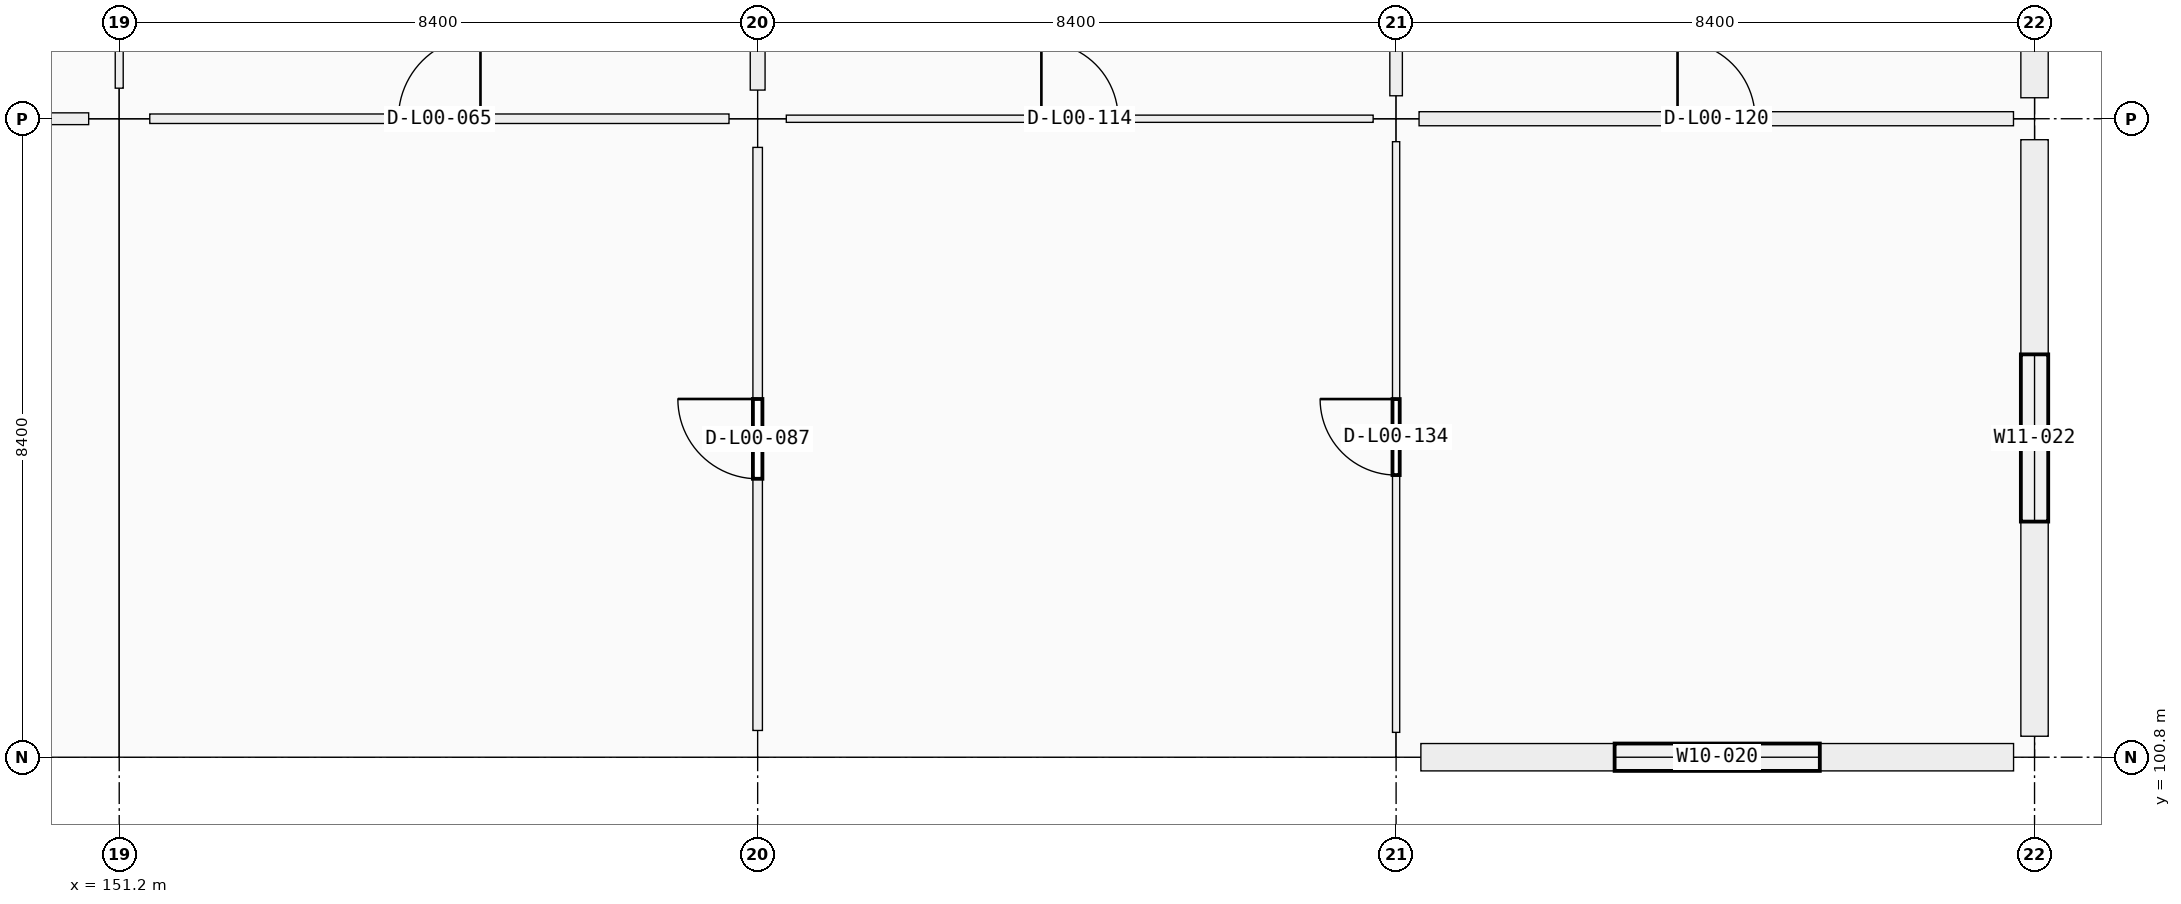
"""IFC4 building model, lengths in metres.
Left out: names, types, materials, properties, quantities, classifications, styles, units other than length and angle.
Written with IfcOpenShell. Run it as: python <this file> out.ifc"""

import sys

from ifc_helpers import new_model, si_unit, direction, frame, frame_2d, origin, origin_2d, place, context, subcontext, project, spatial, rectangle, extrude, element, fill, save


model = new_model("IFC4")
c1 = context("Model", 3, precision=1e-05, world=origin(), true_north=direction((0.0, 1.0)))
c2 = subcontext(c1, "Body", "Model", "MODEL_VIEW")
j1 = project(units=[si_unit("LENGTHUNIT", "METRE"), si_unit("PLANEANGLEUNIT", "RADIAN")], contexts=[c1])
p1 = place(None, origin())
s1 = spatial("IfcSite", under=j1, at=p1, CompositionType="ELEMENT")
p2 = place(p1, origin())
s2 = spatial("IfcBuilding", under=s1, at=p2, CompositionType="ELEMENT")
p3 = place(p2, origin())
s3 = spatial("IfcBuildingStorey", under=s2, at=p3, CompositionType="ELEMENT", Elevation=0.0)
for number, where, z_axis, x_axis in (
    (1, (151.2, 100.8, 0.0), (0.0, 0.0, 1.0), (1.0, 0.0, 0.0)),
    (2, (151.2, 109.2, 0.0), (0.0, 0.0, 1.0), (1.0, 0.0, 0.0)),
):
    element("IfcColumn", number, at=place(p3, frame(where, z_axis=z_axis, x_axis=x_axis)), inside=s3, PredefinedType="COLUMN", context=c2, shape_type="SweptSolid", body=[
        extrude(rectangle(XDim=0.8, YDim=0.8, at=origin_2d()), origin(), (0.0, 0.0, 1.0), 5.76),
    ])
p4 = place(p3, frame((159.6, 100.8, 0.0), z_axis=(0.0, 0.0, 1.0), x_axis=(1.0, 0.0, 0.0)))
e3 = element("IfcColumn", 3, at=p4, inside=s3, PredefinedType="COLUMN", context=c2, shape_type="SweptSolid", body=[
    extrude(rectangle(XDim=0.7, YDim=0.7, at=origin_2d()), origin(), (0.0, 0.0, 1.0), 5.76),
])
p5 = place(p3, frame((159.6, 109.2, 0.0), z_axis=(0.0, 0.0, 1.0), x_axis=(1.0, 0.0, 0.0)))
e4 = element("IfcColumn", 4, at=p5, inside=s3, PredefinedType="COLUMN", context=c2, shape_type="SweptSolid", body=[
    extrude(rectangle(XDim=0.75, YDim=0.75, at=origin_2d()), origin(), (0.0, 0.0, 1.0), 5.76),
])
p6 = place(p3, frame((168.0, 100.8, 0.0), z_axis=(0.0, 0.0, 1.0), x_axis=(1.0, 0.0, 0.0)))
e5 = element("IfcColumn", 5, at=p6, inside=s3, PredefinedType="COLUMN", context=c2, shape_type="SweptSolid", body=[
    extrude(rectangle(XDim=0.65, YDim=0.65, at=origin_2d()), origin(), (0.0, 0.0, 1.0), 5.76),
])
p7 = place(p3, frame((168.0, 109.2, 0.0), z_axis=(0.0, 0.0, 1.0), x_axis=(1.0, 0.0, 0.0)))
e6 = element("IfcColumn", 6, at=p7, inside=s3, PredefinedType="COLUMN", context=c2, shape_type="SweptSolid", body=[
    extrude(rectangle(XDim=0.6, YDim=0.6, at=origin_2d()), origin(), (0.0, 0.0, 1.0), 5.76),
])
for number, where, z_axis, x_axis in (
    (7, (176.4, 100.8, 0.0), (0.0, 0.0, 1.0), (1.0, 0.0, 0.0)),
    (8, (176.4, 109.2, 0.0), (0.0, 0.0, 1.0), (1.0, 0.0, 0.0)),
):
    element("IfcColumn", number, at=place(p3, frame(where, z_axis=z_axis, x_axis=x_axis)), inside=s3, PredefinedType="COLUMN", context=c2, shape_type="SweptSolid", body=[
        extrude(rectangle(XDim=0.55, YDim=0.55, at=origin_2d()), origin(), (0.0, 0.0, 1.0), 5.51),
    ])
p8 = place(p3, frame((176.124, 100.8, 0.0), z_axis=(0.0, 0.0, 1.0), x_axis=(-1.0, 0.0, 0.0)))
e9 = element("IfcWall", 9, at=p8, inside=s3, PredefinedType="SOLIDWALL", context=c2, shape_type="SweptSolid", body=[
    extrude(rectangle(XDim=7.798, YDim=0.36, at=frame_2d((3.899, 0.0))), origin(), (0.0, 0.0, 1.0), 4.7),
])
p9 = place(p8, frame((2.549, 0.0, 0.9)))
e10 = element("IfcOpeningElement", 10, at=p9, cuts=e9, PredefinedType="OPENING", context=c2, shape_type="SweptSolid", body=[
    extrude(rectangle(XDim=2.7, YDim=1.2, at=frame_2d((1.35, 0.6))), frame((0.0, 0.18, 0.0), z_axis=(0.0, -1.0, 0.0), x_axis=(1.0, 0.0, 0.0)), (0.0, 0.0, 1.0), 0.36),
])
p10 = place(p3, frame((176.4, 108.924, 0.0), z_axis=(0.0, 0.0, 1.0), x_axis=(0.0, -1.0, 0.0)))
e11 = element("IfcWall", 11, at=p10, inside=s3, PredefinedType="SOLIDWALL", context=c2, shape_type="SweptSolid", body=[
    extrude(rectangle(XDim=7.848, YDim=0.36, at=frame_2d((3.924, 0.0))), origin(), (0.0, 0.0, 1.0), 4.7),
])
p11 = place(p10, frame((2.824, 0.0, 0.9)))
e12 = element("IfcOpeningElement", 12, at=p11, cuts=e11, PredefinedType="OPENING", context=c2, shape_type="SweptSolid", body=[
    extrude(rectangle(XDim=2.2, YDim=1.35, at=frame_2d((1.1, 0.675))), frame((0.0, 0.18, 0.0), z_axis=(0.0, -1.0, 0.0), x_axis=(1.0, 0.0, 0.0)), (0.0, 0.0, 1.0), 0.36),
])
p12 = place(p3, frame((176.4, 117.324, 0.0), z_axis=(0.0, 0.0, 1.0), x_axis=(0.0, -1.0, 0.0)))
e13 = element("IfcWall", 13, at=p12, inside=s3, PredefinedType="SOLIDWALL", context=c2, shape_type="SweptSolid", body=[
    extrude(rectangle(XDim=7.848, YDim=0.36, at=frame_2d((3.924, 0.0))), origin(), (0.0, 0.0, 1.0), 4.7),
])
p13 = place(p12, frame((2.824, 0.0, 0.9)))
e14 = element("IfcOpeningElement", 14, at=p13, cuts=e13, PredefinedType="OPENING", context=c2, shape_type="SweptSolid", body=[
    extrude(rectangle(XDim=2.2, YDim=1.75, at=frame_2d((1.1, 0.875))), frame((0.0, 0.18, 0.0), z_axis=(0.0, -1.0, 0.0), x_axis=(1.0, 0.0, 0.0)), (0.0, 0.0, 1.0), 0.36),
])
p14 = place(p3, frame((143.202, 109.2, 0.0), z_axis=(0.0, 0.0, 1.0), x_axis=(1.0, 0.0, 0.0)))
e15 = element("IfcWall", 15, at=p14, inside=s3, PredefinedType="PARTITIONING", context=c2, shape_type="SweptSolid", body=[
    extrude(rectangle(XDim=7.596, YDim=0.155, at=frame_2d((3.798, 0.0))), origin(), (0.0, 0.0, 1.0), 3.66),
])
p15 = place(p14, frame((3.333, 0.0, 0.0)))
e16 = element("IfcOpeningElement", 16, at=p15, cuts=e15, PredefinedType="OPENING", context=c2, shape_type="SweptSolid", body=[
    extrude(rectangle(XDim=0.93, YDim=2.12, at=frame_2d((0.465, 1.06))), frame((0.0, 0.078, 0.0), z_axis=(0.0, -1.0, 0.0), x_axis=(1.0, 0.0, 0.0)), (0.0, 0.0, 1.0), 0.155),
])
p16 = place(p3, frame((151.602, 109.2, 0.0), z_axis=(0.0, 0.0, 1.0), x_axis=(1.0, 0.0, 0.0)))
e17 = element("IfcWall", 17, at=p16, inside=s3, PredefinedType="PARTITIONING", context=c2, shape_type="SweptSolid", body=[
    extrude(rectangle(XDim=7.621, YDim=0.125, at=frame_2d((3.811, 0.0))), origin(), (0.0, 0.0, 1.0), 3.66),
])
p17 = place(p16, frame((3.271, 0.0, 0.0)))
e18 = element("IfcOpeningElement", 18, at=p17, cuts=e17, PredefinedType="OPENING", context=c2, shape_type="SweptSolid", body=[
    extrude(rectangle(XDim=1.08, YDim=2.25, at=frame_2d((0.54, 1.125))), frame((0.0, 0.062, 0.0), z_axis=(0.0, -1.0, 0.0), x_axis=(1.0, 0.0, 0.0)), (0.0, 0.0, 1.0), 0.125),
])
p18 = place(p3, frame((159.977, 109.2, 0.0), z_axis=(0.0, 0.0, 1.0), x_axis=(1.0, 0.0, 0.0)))
e19 = element("IfcWall", 19, at=p18, inside=s3, PredefinedType="PARTITIONING", context=c2, shape_type="SweptSolid", body=[
    extrude(rectangle(XDim=7.721, YDim=0.095, at=frame_2d((3.86, 0.0))), origin(), (0.0, 0.0, 1.0), 3.66),
])
p19 = place(p18, frame((3.356, 0.0, 0.0)))
e20 = element("IfcOpeningElement", 20, at=p19, cuts=e19, PredefinedType="OPENING", context=c2, shape_type="SweptSolid", body=[
    extrude(rectangle(XDim=1.01, YDim=2.12, at=frame_2d((0.505, 1.06))), frame((0.0, 0.047, 0.0), z_axis=(0.0, -1.0, 0.0), x_axis=(1.0, 0.0, 0.0)), (0.0, 0.0, 1.0), 0.095),
])
p20 = place(p3, frame((168.302, 109.2, 0.0), z_axis=(0.0, 0.0, 1.0), x_axis=(1.0, 0.0, 0.0)))
e21 = element("IfcWall", 21, at=p20, inside=s3, PredefinedType="PARTITIONING", context=c2, shape_type="SweptSolid", body=[
    extrude(rectangle(XDim=7.821, YDim=0.185, at=frame_2d((3.911, 0.0))), origin(), (0.0, 0.0, 1.0), 3.66),
])
p21 = place(p20, frame((3.401, 0.0, 0.0)))
e22 = element("IfcOpeningElement", 22, at=p21, cuts=e21, PredefinedType="OPENING", context=c2, shape_type="SweptSolid", body=[
    extrude(rectangle(XDim=1.02, YDim=2.2, at=frame_2d((0.51, 1.1))), frame((0.0, 0.093, 0.0), z_axis=(0.0, -1.0, 0.0), x_axis=(1.0, 0.0, 0.0)), (0.0, 0.0, 1.0), 0.185),
])
p22 = place(p3, frame((151.2, 109.602, 0.0), z_axis=(0.0, 0.0, 1.0), x_axis=(0.0, 1.0, 0.0)))
e23 = element("IfcWall", 23, at=p22, inside=s3, PredefinedType="PARTITIONING", context=c2, shape_type="SweptSolid", body=[
    extrude(rectangle(XDim=7.721, YDim=0.105, at=frame_2d((3.86, 0.0))), origin(), (0.0, 0.0, 1.0), 3.66),
])
p23 = place(p22, frame((3.401, 0.0, 0.0)))
e24 = element("IfcOpeningElement", 24, at=p23, cuts=e23, PredefinedType="OPENING", context=c2, shape_type="SweptSolid", body=[
    extrude(rectangle(XDim=0.92, YDim=2.15, at=frame_2d((0.46, 1.075))), frame((0.0, 0.052, 0.0), z_axis=(0.0, -1.0, 0.0), x_axis=(1.0, 0.0, 0.0)), (0.0, 0.0, 1.0), 0.105),
])
p24 = place(p3, frame((159.6, 101.152, 0.0), z_axis=(0.0, 0.0, 1.0), x_axis=(0.0, 1.0, 0.0)))
e25 = element("IfcWall", 25, at=p24, inside=s3, PredefinedType="PARTITIONING", context=c2, shape_type="SweptSolid", body=[
    extrude(rectangle(XDim=7.671, YDim=0.125, at=frame_2d((3.835, 0.0))), origin(), (0.0, 0.0, 1.0), 3.66),
])
p25 = place(p24, frame((3.311, 0.0, 0.0)))
e26 = element("IfcOpeningElement", 26, at=p25, cuts=e25, PredefinedType="OPENING", context=c2, shape_type="SweptSolid", body=[
    extrude(rectangle(XDim=1.05, YDim=2.12, at=frame_2d((0.525, 1.06))), frame((0.0, 0.062, 0.0), z_axis=(0.0, -1.0, 0.0), x_axis=(1.0, 0.0, 0.0)), (0.0, 0.0, 1.0), 0.125),
])
p26 = place(p3, frame((159.6, 109.577, 0.0), z_axis=(0.0, 0.0, 1.0), x_axis=(0.0, 1.0, 0.0)))
e27 = element("IfcWall", 27, at=p26, inside=s3, PredefinedType="PARTITIONING", context=c2, shape_type="SweptSolid", body=[
    extrude(rectangle(XDim=7.671, YDim=0.195, at=frame_2d((3.835, 0.0))), origin(), (0.0, 0.0, 1.0), 3.66),
])
p27 = place(p26, frame((3.351, 0.0, 0.0)))
e28 = element("IfcOpeningElement", 28, at=p27, cuts=e27, PredefinedType="OPENING", context=c2, shape_type="SweptSolid", body=[
    extrude(rectangle(XDim=0.97, YDim=2.12, at=frame_2d((0.485, 1.06))), frame((0.0, 0.098, 0.0), z_axis=(0.0, -1.0, 0.0), x_axis=(1.0, 0.0, 0.0)), (0.0, 0.0, 1.0), 0.195),
])
p28 = place(p3, frame((168.0, 101.127, 0.0), z_axis=(0.0, 0.0, 1.0), x_axis=(0.0, 1.0, 0.0)))
e29 = element("IfcWall", 29, at=p28, inside=s3, PredefinedType="PARTITIONING", context=c2, shape_type="SweptSolid", body=[
    extrude(rectangle(XDim=7.771, YDim=0.095, at=frame_2d((3.885, 0.0))), origin(), (0.0, 0.0, 1.0), 3.66),
])
p29 = place(p28, frame((3.385, 0.0, 0.0)))
e30 = element("IfcOpeningElement", 30, at=p29, cuts=e29, PredefinedType="OPENING", context=c2, shape_type="SweptSolid", body=[
    extrude(rectangle(XDim=1.0, YDim=2.2, at=frame_2d((0.5, 1.1))), frame((0.0, 0.047, 0.0), z_axis=(0.0, -1.0, 0.0), x_axis=(1.0, 0.0, 0.0)), (0.0, 0.0, 1.0), 0.095),
])
p30 = place(p3, frame((168.0, 109.502, 0.0), z_axis=(0.0, 0.0, 1.0), x_axis=(0.0, 1.0, 0.0)))
e31 = element("IfcWall", 31, at=p30, inside=s3, PredefinedType="PARTITIONING", context=c2, shape_type="SweptSolid", body=[
    extrude(rectangle(XDim=7.771, YDim=0.165, at=frame_2d((3.885, 0.0))), origin(), (0.0, 0.0, 1.0), 3.66),
])
p31 = place(p30, frame((3.365, 0.0, 0.0)))
e32 = element("IfcOpeningElement", 32, at=p31, cuts=e31, PredefinedType="OPENING", context=c2, shape_type="SweptSolid", body=[
    extrude(rectangle(XDim=1.04, YDim=2.2, at=frame_2d((0.52, 1.1))), frame((0.0, 0.083, 0.0), z_axis=(0.0, -1.0, 0.0), x_axis=(1.0, 0.0, 0.0)), (0.0, 0.0, 1.0), 0.165),
])
p32 = place(p9, origin())
e33 = element("IfcWindow", 33, at=p32, inside=s3, PartitioningType="SINGLE_PANEL", PredefinedType="WINDOW", context=c2, shape_type="SweptSolid", body=[
    extrude(rectangle(XDim=2.7, YDim=1.2, at=frame_2d((1.35, 0.6))), frame((0.0, 0.03, 0.0), z_axis=(0.0, -1.0, 0.0), x_axis=(1.0, 0.0, 0.0)), (0.0, 0.0, 1.0), 0.06),
])
fill(e10, e33)
p33 = place(p11, origin())
e34 = element("IfcWindow", 34, at=p33, inside=s3, PartitioningType="SINGLE_PANEL", PredefinedType="WINDOW", context=c2, shape_type="SweptSolid", body=[
    extrude(rectangle(XDim=2.2, YDim=1.35, at=frame_2d((1.1, 0.675))), frame((0.0, 0.03, 0.0), z_axis=(0.0, -1.0, 0.0), x_axis=(1.0, 0.0, 0.0)), (0.0, 0.0, 1.0), 0.06),
])
fill(e12, e34)
p34 = place(p17, origin())
e35 = element("IfcDoor", 35, at=p34, inside=s3, OperationType="SINGLE_SWING_RIGHT", PredefinedType="DOOR", context=c2, shape_type="SweptSolid", body=[
    extrude(rectangle(XDim=1.08, YDim=2.25, at=frame_2d((0.54, 1.125))), frame((0.0, 0.025, 0.0), z_axis=(0.0, -1.0, 0.0), x_axis=(1.0, 0.0, 0.0)), (0.0, 0.0, 1.0), 0.05),
])
fill(e18, e35)
p35 = place(p25, origin())
e36 = element("IfcDoor", 36, at=p35, inside=s3, OperationType="SINGLE_SWING_RIGHT", PredefinedType="DOOR", context=c2, shape_type="SweptSolid", body=[
    extrude(rectangle(XDim=1.05, YDim=2.12, at=frame_2d((0.525, 1.06))), frame((0.0, 0.025, 0.0), z_axis=(0.0, -1.0, 0.0), x_axis=(1.0, 0.0, 0.0)), (0.0, 0.0, 1.0), 0.05),
])
fill(e26, e36)
p36 = place(p19, origin())
e37 = element("IfcDoor", 37, at=p36, inside=s3, OperationType="SINGLE_SWING_LEFT", PredefinedType="DOOR", context=c2, shape_type="SweptSolid", body=[
    extrude(rectangle(XDim=1.01, YDim=2.12, at=frame_2d((0.505, 1.06))), frame((0.0, 0.025, 0.0), z_axis=(0.0, -1.0, 0.0), x_axis=(1.0, 0.0, 0.0)), (0.0, 0.0, 1.0), 0.05),
])
fill(e20, e37)
p37 = place(p21, origin())
e38 = element("IfcDoor", 38, at=p37, inside=s3, OperationType="SINGLE_SWING_LEFT", PredefinedType="DOOR", context=c2, shape_type="SweptSolid", body=[
    extrude(rectangle(XDim=1.02, YDim=2.2, at=frame_2d((0.51, 1.1))), frame((0.0, 0.025, 0.0), z_axis=(0.0, -1.0, 0.0), x_axis=(1.0, 0.0, 0.0)), (0.0, 0.0, 1.0), 0.05),
])
fill(e22, e38)
p38 = place(p29, origin())
e39 = element("IfcDoor", 39, at=p38, inside=s3, OperationType="SINGLE_SWING_RIGHT", PredefinedType="DOOR", context=c2, shape_type="SweptSolid", body=[
    extrude(rectangle(XDim=1.0, YDim=2.2, at=frame_2d((0.5, 1.1))), frame((0.0, 0.025, 0.0), z_axis=(0.0, -1.0, 0.0), x_axis=(1.0, 0.0, 0.0)), (0.0, 0.0, 1.0), 0.05),
])
fill(e30, e39)
save(model, sys.argv[1])
